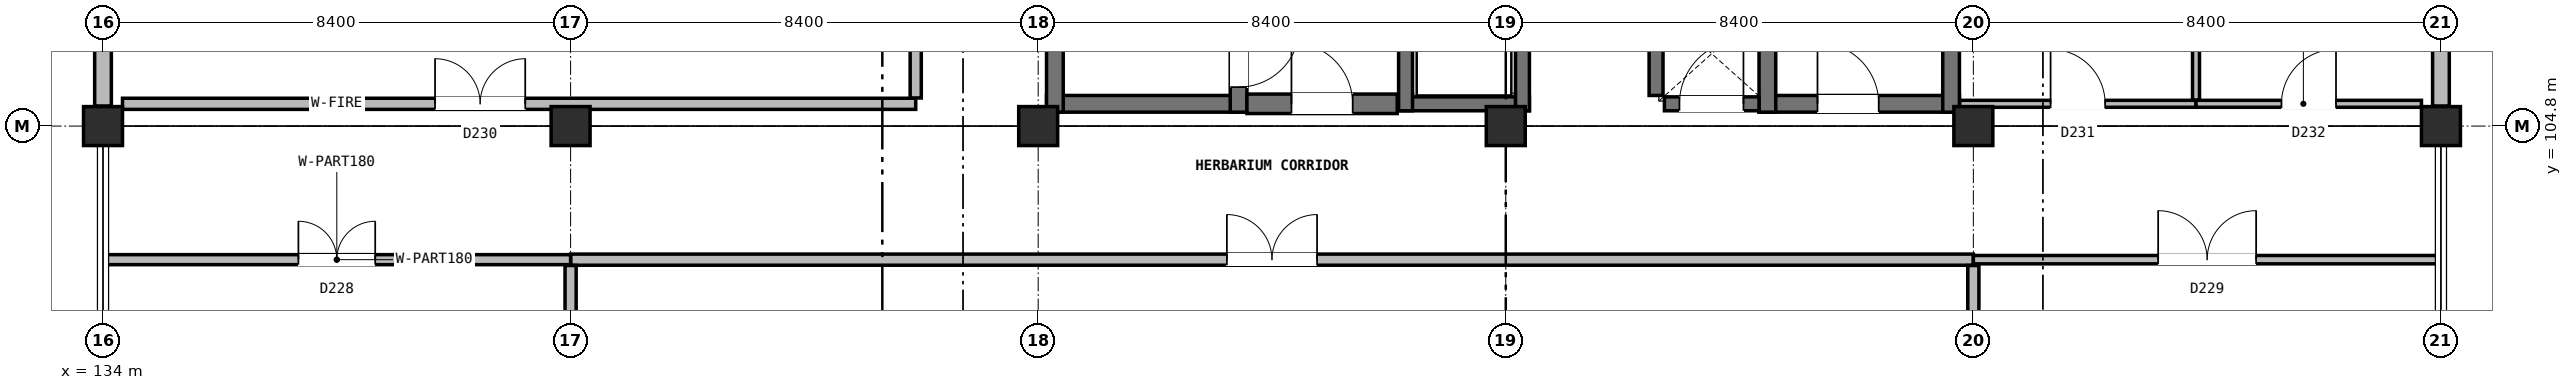
"""IFC4 building model, lengths in metres.
Left out: names, types, materials, properties, quantities, classifications, styles, units other than length and angle.
Written with IfcOpenShell. Run it as: python <this file> out.ifc"""

import sys

from ifc_helpers import new_model, si_unit, direction, frame, frame_2d, origin, origin_2d, place, context, subcontext, project, spatial, rectangle, extrude, element, fill, save


model = new_model("IFC4")
c1 = context("Model", 3, precision=1e-05, world=origin(), true_north=direction((0.0, 1.0)))
c2 = subcontext(c1, "Body", "Model", "MODEL_VIEW")
j1 = project(units=[si_unit("LENGTHUNIT", "METRE"), si_unit("PLANEANGLEUNIT", "RADIAN")], contexts=[c1])
p1 = place(None, origin())
s1 = spatial("IfcSite", under=j1, at=p1, CompositionType="ELEMENT")
p2 = place(p1, origin())
s2 = spatial("IfcBuilding", under=s1, at=p2, CompositionType="ELEMENT")
p3 = place(p2, frame((0.0, 0.0, 32.8)))
s3 = spatial("IfcBuildingStorey", under=s2, at=p3, CompositionType="ELEMENT", Elevation=32.8)
for number, where, z_axis, x_axis in (
    (1, (134.0, 104.8, 0.0), (0.0, 0.0, 1.0), (1.0, 0.0, 0.0)),
    (2, (142.4, 104.8, 0.0), (0.0, 0.0, 1.0), (1.0, 0.0, 0.0)),
    (3, (150.8, 104.8, 0.0), (0.0, 0.0, 1.0), (1.0, 0.0, 0.0)),
    (4, (159.2, 104.8, 0.0), (0.0, 0.0, 1.0), (1.0, 0.0, 0.0)),
    (5, (167.6, 104.8, 0.0), (0.0, 0.0, 1.0), (1.0, 0.0, 0.0)),
    (6, (176.0, 104.8, 0.0), (0.0, 0.0, 1.0), (1.0, 0.0, 0.0)),
):
    element("IfcColumn", number, at=place(p3, frame(where, z_axis=z_axis, x_axis=x_axis)), inside=s3, PredefinedType="COLUMN", context=c2, shape_type="SweptSolid", body=[
        extrude(rectangle(XDim=0.7, YDim=0.7, at=origin_2d()), origin(), (0.0, 0.0, 1.0), 4.0),
    ])
p4 = place(p3, frame((176.0, 105.16, 0.0), z_axis=(0.0, 0.0, 1.0), x_axis=(0.0, 1.0, 0.0)))
e7 = element("IfcWall", 7, at=p4, inside=s3, PredefinedType="SOLIDWALL", context=c2, shape_type="SweptSolid", body=[
    extrude(rectangle(XDim=8.08, YDim=0.3, at=frame_2d((4.04, 0.0))), origin(), (0.0, 0.0, 1.0), 3.25),
])
p5 = place(p4, frame((2.86, 0.0, 0.9)))
e8 = element("IfcOpeningElement", 8, at=p5, cuts=e7, PredefinedType="OPENING", context=c2, shape_type="SweptSolid", body=[
    extrude(rectangle(XDim=2.4, YDim=2.0, at=frame_2d((1.2, 1.0))), frame((0.0, 0.16, 0.0), z_axis=(0.0, -1.0, 0.0), x_axis=(1.0, 0.0, 0.0)), (0.0, 0.0, 1.0), 0.32),
])
p6 = place(p3, frame((134.0, 113.24, 0.0), z_axis=(0.0, 0.0, 1.0), x_axis=(0.0, -1.0, 0.0)))
e9 = element("IfcWall", 9, at=p6, inside=s3, PredefinedType="SOLIDWALL", context=c2, shape_type="SweptSolid", body=[
    extrude(rectangle(XDim=8.08, YDim=0.3, at=frame_2d((4.04, 0.0))), origin(), (0.0, 0.0, 1.0), 3.25),
])
p7 = place(p6, frame((2.32, 0.0, 0.9)))
e10 = element("IfcOpeningElement", 10, at=p7, cuts=e9, PredefinedType="OPENING", context=c2, shape_type="SweptSolid", body=[
    extrude(rectangle(XDim=3.4, YDim=2.15, at=frame_2d((1.7, 1.075))), frame((0.0, 0.16, 0.0), z_axis=(0.0, -1.0, 0.0), x_axis=(1.0, 0.0, 0.0)), (0.0, 0.0, 1.0), 0.32),
])
p8 = place(p3, frame((150.95, 105.2, 0.0), z_axis=(0.0, 0.0, 1.0), x_axis=(1.0, 0.0, 0.0)))
e11 = element("IfcWall", 11, at=p8, inside=s3, PredefinedType="SHEAR", context=c2, shape_type="SweptSolid", body=[
    extrude(rectangle(XDim=3.6, YDim=0.3, at=frame_2d((1.8, 0.0))), origin(), (0.0, 0.0, 1.0), 4.0),
])
p9 = place(p3, frame((151.1, 105.05, 0.0), z_axis=(0.0, 0.0, 1.0), x_axis=(0.0, 1.0, 0.0)))
e12 = element("IfcWall", 12, at=p9, inside=s3, PredefinedType="SHEAR", context=c2, shape_type="SweptSolid", body=[
    extrude(rectangle(XDim=8.3, YDim=0.3, at=frame_2d((4.15, 0.0))), origin(), (0.0, 0.0, 1.0), 4.0),
])
p10 = place(p3, frame((154.4, 105.05, 0.0), z_axis=(0.0, 0.0, 1.0), x_axis=(0.0, 1.0, 0.0)))
e13 = element("IfcWall", 13, at=p10, inside=s3, PredefinedType="SHEAR", context=c2, shape_type="SweptSolid", body=[
    extrude(rectangle(XDim=8.3, YDim=0.3, at=frame_2d((4.15, 0.0))), origin(), (0.0, 0.0, 1.0), 4.0),
])
p11 = place(p10, frame((0.45, 0.0, 0.0)))
e14 = element("IfcOpeningElement", 14, at=p11, cuts=e13, PredefinedType="OPENING", context=c2, shape_type="SweptSolid", body=[
    extrude(rectangle(XDim=1.1, YDim=2.2, at=frame_2d((0.55, 1.1))), frame((0.0, 0.16, 0.0), z_axis=(0.0, -1.0, 0.0), x_axis=(1.0, 0.0, 0.0)), (0.0, 0.0, 1.0), 0.32),
])
p12 = place(p3, frame((163.75, 105.2, 0.0), z_axis=(0.0, 0.0, 1.0), x_axis=(1.0, 0.0, 0.0)))
e15 = element("IfcWall", 15, at=p12, inside=s3, PredefinedType="SHEAR", context=c2, shape_type="SweptSolid", body=[
    extrude(rectangle(XDim=3.6, YDim=0.3, at=frame_2d((1.8, 0.0))), origin(), (0.0, 0.0, 1.0), 4.0),
])
p13 = place(p12, frame((1.05, 0.0, 0.0)))
e16 = element("IfcOpeningElement", 16, at=p13, cuts=e15, PredefinedType="OPENING", context=c2, shape_type="SweptSolid", body=[
    extrude(rectangle(XDim=1.1, YDim=2.2, at=frame_2d((0.55, 1.1))), frame((0.0, 0.16, 0.0), z_axis=(0.0, -1.0, 0.0), x_axis=(1.0, 0.0, 0.0)), (0.0, 0.0, 1.0), 0.32),
])
for number, where, z_axis, x_axis in (
    (17, (163.9, 105.05, 0.0), (0.0, 0.0, 1.0), (0.0, 1.0, 0.0)),
    (18, (167.2, 105.05, 0.0), (0.0, 0.0, 1.0), (0.0, 1.0, 0.0)),
):
    element("IfcWall", number, at=place(p3, frame(where, z_axis=z_axis, x_axis=x_axis)), inside=s3, PredefinedType="SHEAR", context=c2, shape_type="SweptSolid", body=[
        extrude(rectangle(XDim=8.3, YDim=0.3, at=frame_2d((4.15, 0.0))), origin(), (0.0, 0.0, 1.0), 4.0),
    ])
p14 = place(p3, frame((157.275, 105.2, 0.0), z_axis=(0.0, 0.0, 1.0), x_axis=(1.0, 0.0, 0.0)))
e19 = element("IfcWall", 19, at=p14, inside=s3, PredefinedType="SOLIDWALL", context=c2, shape_type="SweptSolid", body=[
    extrude(rectangle(XDim=2.35, YDim=0.25, at=frame_2d((1.175, 0.0))), origin(), (0.0, 0.0, 1.0), 3.68),
])
for number, where, z_axis, x_axis in (
    (20, (157.4, 105.075, 0.0), (0.0, 0.0, 1.0), (0.0, 1.0, 0.0)),
    (21, (159.5, 105.075, 0.0), (0.0, 0.0, 1.0), (0.0, 1.0, 0.0)),
):
    element("IfcWall", number, at=place(p3, frame(where, z_axis=z_axis, x_axis=x_axis)), inside=s3, PredefinedType="SOLIDWALL", context=c2, shape_type="SweptSolid", body=[
        extrude(rectangle(XDim=2.65, YDim=0.25, at=frame_2d((1.325, 0.0))), origin(), (0.0, 0.0, 1.0), 3.68),
    ])
p15 = place(p3, frame((154.55, 105.2, 0.0), z_axis=(0.0, 0.0, 1.0), x_axis=(1.0, 0.0, 0.0)))
e22 = element("IfcWall", 22, at=p15, inside=s3, PredefinedType="SHEAR", context=c2, shape_type="SweptSolid", body=[
    extrude(rectangle(XDim=2.7, YDim=0.35, at=frame_2d((1.35, 0.0))), origin(), (0.0, 0.0, 1.0), 3.68),
])
p16 = place(p15, frame((0.8, 0.0, 0.0)))
e23 = element("IfcOpeningElement", 23, at=p16, cuts=e22, PredefinedType="OPENING", context=c2, shape_type="SweptSolid", body=[
    extrude(rectangle(XDim=1.1, YDim=2.2, at=frame_2d((0.55, 1.1))), frame((0.0, 0.185, 0.0), z_axis=(0.0, -1.0, 0.0), x_axis=(1.0, 0.0, 0.0)), (0.0, 0.0, 1.0), 0.37),
])
p17 = place(p3, frame((161.9, 105.35, 0.0), z_axis=(0.0, 0.0, 1.0), x_axis=(0.0, 1.0, 0.0)))
e24 = element("IfcWall", 24, at=p17, inside=s3, PredefinedType="SOLIDWALL", context=c2, shape_type="SweptSolid", body=[
    extrude(rectangle(XDim=1.5, YDim=0.25, at=frame_2d((0.75, 0.0))), origin(), (0.0, 0.0, 1.0), 3.68),
])
p18 = place(p3, frame((162.05, 105.2, 0.0), z_axis=(0.0, 0.0, 1.0), x_axis=(1.0, 0.0, 0.0)))
e25 = element("IfcWall", 25, at=p18, inside=s3, PredefinedType="SOLIDWALL", context=c2, shape_type="SweptSolid", body=[
    extrude(rectangle(XDim=1.7, YDim=0.25, at=frame_2d((0.85, 0.0))), origin(), (0.0, 0.0, 1.0), 3.68),
])
p19 = place(p18, frame((0.27, 0.0, 0.0)))
e26 = element("IfcOpeningElement", 26, at=p19, cuts=e25, PredefinedType="OPENING", context=c2, shape_type="SweptSolid", body=[
    extrude(rectangle(XDim=1.15, YDim=2.2, at=frame_2d((0.575, 1.1))), frame((0.0, 0.135, 0.0), z_axis=(0.0, -1.0, 0.0), x_axis=(1.0, 0.0, 0.0)), (0.0, 0.0, 1.0), 0.27),
])
p20 = place(p3, frame((142.4, 102.4, 0.0), z_axis=(0.0, 0.0, 1.0), x_axis=(1.0, 0.0, 0.0)))
e27 = element("IfcWall", 27, at=p20, inside=s3, PredefinedType="PARTITIONING", context=c2, shape_type="SweptSolid", body=[
    extrude(rectangle(XDim=25.2, YDim=0.2, at=frame_2d((12.6, 0.0))), origin(), (0.0, 0.0, 1.0), 3.665),
])
p21 = place(p20, frame((11.79, 0.0, 0.0)))
e28 = element("IfcOpeningElement", 28, at=p21, cuts=e27, PredefinedType="OPENING", context=c2, shape_type="SweptSolid", body=[
    extrude(rectangle(XDim=1.62, YDim=2.25, at=frame_2d((0.81, 1.125))), frame((0.0, 0.11, 0.0), z_axis=(0.0, -1.0, 0.0), x_axis=(1.0, 0.0, 0.0)), (0.0, 0.0, 1.0), 0.22),
])
p22 = place(p3, frame((134.0, 102.4, 0.0), z_axis=(0.0, 0.0, 1.0), x_axis=(1.0, 0.0, 0.0)))
e29 = element("IfcWall", 29, at=p22, inside=s3, PredefinedType="PARTITIONING", context=c2, shape_type="SweptSolid", body=[
    extrude(rectangle(XDim=8.4, YDim=0.18, at=frame_2d((4.2, 0.0))), origin(), (0.0, 0.0, 1.0), 3.665),
])
p23 = place(p22, frame((3.51, 0.0, 0.0)))
e30 = element("IfcOpeningElement", 30, at=p23, cuts=e29, PredefinedType="OPENING", context=c2, shape_type="SweptSolid", body=[
    extrude(rectangle(XDim=1.38, YDim=2.2, at=frame_2d((0.69, 1.1))), frame((0.0, 0.1, 0.0), z_axis=(0.0, -1.0, 0.0), x_axis=(1.0, 0.0, 0.0)), (0.0, 0.0, 1.0), 0.2),
])
p24 = place(p3, frame((167.6, 102.4, 0.0), z_axis=(0.0, 0.0, 1.0), x_axis=(1.0, 0.0, 0.0)))
e31 = element("IfcWall", 31, at=p24, inside=s3, PredefinedType="PARTITIONING", context=c2, shape_type="SweptSolid", body=[
    extrude(rectangle(XDim=8.4, YDim=0.15, at=frame_2d((4.2, 0.0))), origin(), (0.0, 0.0, 1.0), 3.665),
])
p25 = place(p24, frame((3.32, 0.0, 0.0)))
e32 = element("IfcOpeningElement", 32, at=p25, cuts=e31, PredefinedType="OPENING", context=c2, shape_type="SweptSolid", body=[
    extrude(rectangle(XDim=1.76, YDim=2.36, at=frame_2d((0.88, 1.18))), frame((0.0, 0.085, 0.0), z_axis=(0.0, -1.0, 0.0), x_axis=(1.0, 0.0, 0.0)), (0.0, 0.0, 1.0), 0.17),
])
p26 = place(p3, frame((134.35, 105.2, 0.0), z_axis=(0.0, 0.0, 1.0), x_axis=(1.0, 0.0, 0.0)))
e33 = element("IfcWall", 33, at=p26, inside=s3, PredefinedType="PARTITIONING", context=c2, shape_type="SweptSolid", body=[
    extrude(rectangle(XDim=14.25, YDim=0.2, at=frame_2d((7.125, 0.0))), origin(), (0.0, 0.0, 1.0), 3.245),
])
p27 = place(p26, frame((5.615, 0.0, 0.0)))
e34 = element("IfcOpeningElement", 34, at=p27, cuts=e33, PredefinedType="OPENING", context=c2, shape_type="SweptSolid", body=[
    extrude(rectangle(XDim=1.62, YDim=2.25, at=frame_2d((0.81, 1.125))), frame((0.0, 0.11, 0.0), z_axis=(0.0, -1.0, 0.0), x_axis=(1.0, 0.0, 0.0)), (0.0, 0.0, 1.0), 0.22),
])
p28 = place(p3, frame((167.355, 105.2, 0.0), z_axis=(0.0, 0.0, 1.0), x_axis=(1.0, 0.0, 0.0)))
e35 = element("IfcWall", 35, at=p28, inside=s3, PredefinedType="PARTITIONING", context=c2, shape_type="SweptSolid", body=[
    extrude(rectangle(XDim=4.245, YDim=0.125, at=frame_2d((2.123, 0.0))), origin(), (0.0, 0.0, 1.0), 3.245),
])
p29 = place(p28, frame((1.633, 0.0, 0.0)))
e36 = element("IfcOpeningElement", 36, at=p29, cuts=e35, PredefinedType="OPENING", context=c2, shape_type="SweptSolid", body=[
    extrude(rectangle(XDim=0.98, YDim=2.1, at=frame_2d((0.49, 1.05))), frame((0.0, 0.073, 0.0), z_axis=(0.0, -1.0, 0.0), x_axis=(1.0, 0.0, 0.0)), (0.0, 0.0, 1.0), 0.145),
])
p30 = place(p3, frame((171.6, 105.2, 0.0), z_axis=(0.0, 0.0, 1.0), x_axis=(1.0, 0.0, 0.0)))
e37 = element("IfcWall", 37, at=p30, inside=s3, PredefinedType="PARTITIONING", context=c2, shape_type="SweptSolid", body=[
    extrude(rectangle(XDim=4.05, YDim=0.125, at=frame_2d((2.025, 0.0))), origin(), (0.0, 0.0, 1.0), 3.245),
])
p31 = place(p30, frame((1.535, 0.0, 0.0)))
e38 = element("IfcOpeningElement", 38, at=p31, cuts=e37, PredefinedType="OPENING", context=c2, shape_type="SweptSolid", body=[
    extrude(rectangle(XDim=0.98, YDim=2.1, at=frame_2d((0.49, 1.05))), frame((0.0, 0.073, 0.0), z_axis=(0.0, -1.0, 0.0), x_axis=(1.0, 0.0, 0.0)), (0.0, 0.0, 1.0), 0.145),
])
p32 = place(p3, frame((148.6, 105.305, 0.0), z_axis=(0.0, 0.0, 1.0), x_axis=(0.0, 1.0, 0.0)))
e39 = element("IfcWall", 39, at=p32, inside=s3, PredefinedType="PARTITIONING", context=c2, shape_type="SweptSolid", body=[
    extrude(rectangle(XDim=14.095, YDim=0.2, at=frame_2d((7.047, 0.0))), origin(), (0.0, 0.0, 1.0), 3.665),
])
for number, where, z_axis, x_axis in (
    (40, (142.4, 87.55, 0.0), (0.0, 0.0, 1.0), (0.0, 1.0, 0.0)),
    (41, (167.6, 87.55, 0.0), (0.0, 0.0, 1.0), (0.0, 1.0, 0.0)),
):
    element("IfcWall", number, at=place(p3, frame(where, z_axis=z_axis, x_axis=x_axis)), inside=s3, PredefinedType="PARTITIONING", context=c2, shape_type="SweptSolid", body=[
        extrude(rectangle(XDim=14.745, YDim=0.2, at=frame_2d((7.373, 0.0))), origin(), (0.0, 0.0, 1.0), 3.245),
    ])
p33 = place(p3, frame((171.6, 105.268, 0.0), z_axis=(0.0, 0.0, 1.0), x_axis=(0.0, 1.0, 0.0)))
e42 = element("IfcWall", 42, at=p33, inside=s3, PredefinedType="PARTITIONING", context=c2, shape_type="SweptSolid", body=[
    extrude(rectangle(XDim=16.978, YDim=0.125, at=frame_2d((8.489, 0.0))), origin(), (0.0, 0.0, 1.0), 3.665),
])
p34 = place(p11, frame((1.1, 0.0, 0.0), z_axis=(0.0, 0.0, 1.0), x_axis=(-1.0, 0.0, 0.0)))
e43 = element("IfcDoor", 43, at=p34, inside=s3, OperationType="SINGLE_SWING_RIGHT", PredefinedType="DOOR", context=c2, shape_type="SweptSolid", body=[
    extrude(rectangle(XDim=1.1, YDim=2.2, at=frame_2d((0.55, 1.1))), frame((0.0, 0.025, 0.0), z_axis=(0.0, -1.0, 0.0), x_axis=(1.0, 0.0, 0.0)), (0.0, 0.0, 1.0), 0.05),
])
fill(e14, e43)
p35 = place(p13, origin())
e44 = element("IfcDoor", 44, at=p35, inside=s3, OperationType="SINGLE_SWING_LEFT", PredefinedType="DOOR", context=c2, shape_type="SweptSolid", body=[
    extrude(rectangle(XDim=1.1, YDim=2.2, at=frame_2d((0.55, 1.1))), frame((0.0, 0.025, 0.0), z_axis=(0.0, -1.0, 0.0), x_axis=(1.0, 0.0, 0.0)), (0.0, 0.0, 1.0), 0.05),
])
fill(e16, e44)
p36 = place(p16, origin())
e45 = element("IfcDoor", 45, at=p36, inside=s3, OperationType="SINGLE_SWING_LEFT", PredefinedType="DOOR", context=c2, shape_type="SweptSolid", body=[
    extrude(rectangle(XDim=1.1, YDim=2.2, at=frame_2d((0.55, 1.1))), frame((0.0, 0.025, 0.0), z_axis=(0.0, -1.0, 0.0), x_axis=(1.0, 0.0, 0.0)), (0.0, 0.0, 1.0), 0.05),
])
fill(e23, e45)
p37 = place(p19, origin())
e46 = element("IfcDoor", 46, at=p37, inside=s3, OperationType="SINGLE_SWING_RIGHT", PredefinedType="DOOR", context=c2, shape_type="SweptSolid", body=[
    extrude(rectangle(XDim=1.15, YDim=2.2, at=frame_2d((0.575, 1.1))), frame((0.0, 0.025, 0.0), z_axis=(0.0, -1.0, 0.0), x_axis=(1.0, 0.0, 0.0)), (0.0, 0.0, 1.0), 0.05),
])
fill(e26, e46)
p38 = place(p21, origin())
e47 = element("IfcDoor", 47, at=p38, inside=s3, OperationType="DOUBLE_DOOR_SINGLE_SWING", PredefinedType="DOOR", context=c2, shape_type="SweptSolid", body=[
    extrude(rectangle(XDim=1.62, YDim=2.25, at=frame_2d((0.81, 1.125))), frame((0.0, 0.025, 0.0), z_axis=(0.0, -1.0, 0.0), x_axis=(1.0, 0.0, 0.0)), (0.0, 0.0, 1.0), 0.05),
])
fill(e28, e47)
p39 = place(p23, origin())
e48 = element("IfcDoor", 48, at=p39, inside=s3, OperationType="DOUBLE_DOOR_SINGLE_SWING", PredefinedType="DOOR", context=c2, shape_type="SweptSolid", body=[
    extrude(rectangle(XDim=1.38, YDim=2.2, at=frame_2d((0.69, 1.1))), frame((0.0, 0.025, 0.0), z_axis=(0.0, -1.0, 0.0), x_axis=(1.0, 0.0, 0.0)), (0.0, 0.0, 1.0), 0.05),
])
fill(e30, e48)
p40 = place(p25, origin())
e49 = element("IfcDoor", 49, at=p40, inside=s3, OperationType="DOUBLE_DOOR_SINGLE_SWING", PredefinedType="DOOR", context=c2, shape_type="SweptSolid", body=[
    extrude(rectangle(XDim=1.76, YDim=2.36, at=frame_2d((0.88, 1.18))), frame((0.0, 0.025, 0.0), z_axis=(0.0, -1.0, 0.0), x_axis=(1.0, 0.0, 0.0)), (0.0, 0.0, 1.0), 0.05),
])
fill(e32, e49)
p41 = place(p27, origin())
e50 = element("IfcDoor", 50, at=p41, inside=s3, OperationType="DOUBLE_DOOR_SINGLE_SWING", PredefinedType="DOOR", context=c2, shape_type="SweptSolid", body=[
    extrude(rectangle(XDim=1.62, YDim=2.25, at=frame_2d((0.81, 1.125))), frame((0.0, 0.025, 0.0), z_axis=(0.0, -1.0, 0.0), x_axis=(1.0, 0.0, 0.0)), (0.0, 0.0, 1.0), 0.05),
])
fill(e34, e50)
p42 = place(p29, origin())
e51 = element("IfcDoor", 51, at=p42, inside=s3, OperationType="SINGLE_SWING_LEFT", PredefinedType="DOOR", context=c2, shape_type="SweptSolid", body=[
    extrude(rectangle(XDim=0.98, YDim=2.1, at=frame_2d((0.49, 1.05))), frame((0.0, 0.025, 0.0), z_axis=(0.0, -1.0, 0.0), x_axis=(1.0, 0.0, 0.0)), (0.0, 0.0, 1.0), 0.05),
])
fill(e36, e51)
p43 = place(p31, origin())
e52 = element("IfcDoor", 52, at=p43, inside=s3, OperationType="SINGLE_SWING_RIGHT", PredefinedType="DOOR", context=c2, shape_type="SweptSolid", body=[
    extrude(rectangle(XDim=0.98, YDim=2.1, at=frame_2d((0.49, 1.05))), frame((0.0, 0.025, 0.0), z_axis=(0.0, -1.0, 0.0), x_axis=(1.0, 0.0, 0.0)), (0.0, 0.0, 1.0), 0.05),
])
fill(e38, e52)
save(model, sys.argv[1])
